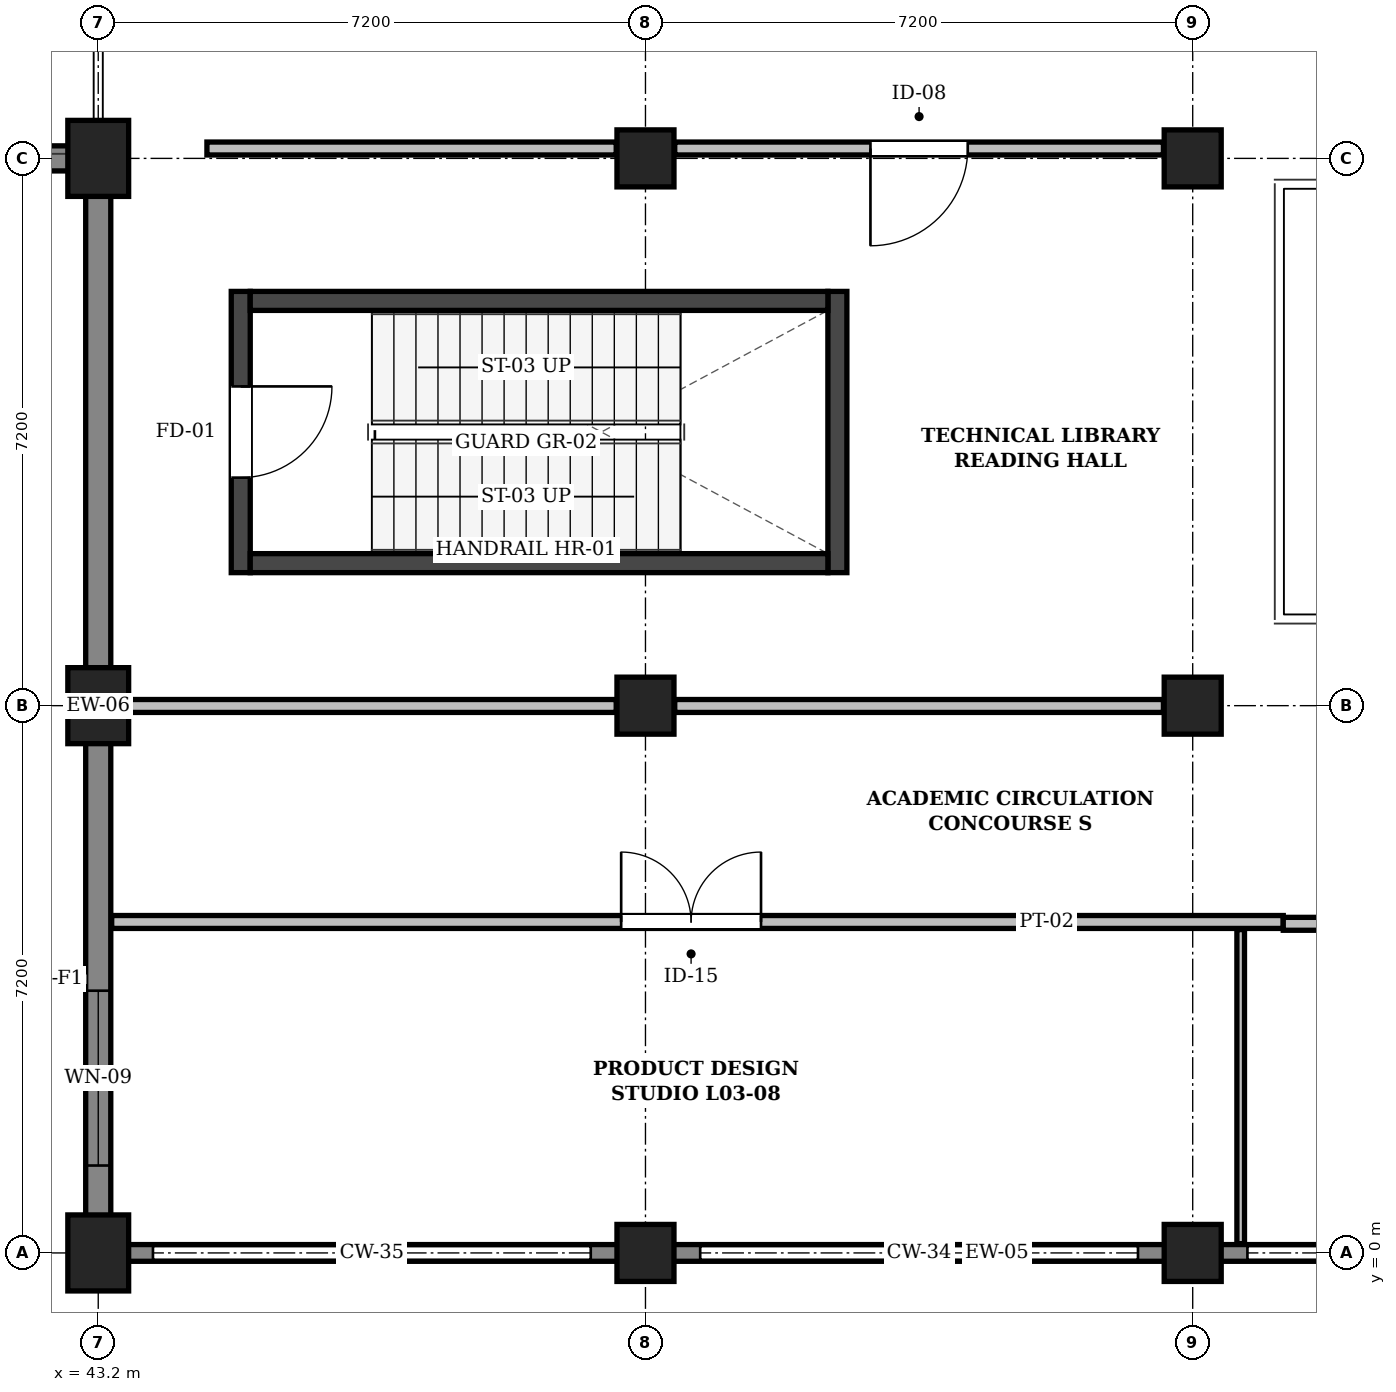
"""IFC4 building model, lengths in metres.
Left out: names, types, materials, properties, quantities, classifications, styles, units other than length and angle.
Written with IfcOpenShell. Run it as: python <this file> out.ifc"""

import sys

from ifc_helpers import new_model, si_unit, direction, frame, frame_2d, origin, origin_2d, place, context, subcontext, project, spatial, rectangle, extrude, element, fill, save


model = new_model("IFC4")
c1 = context("Model", 3, precision=1e-05, world=origin(), true_north=direction((0.0, 1.0)))
c2 = subcontext(c1, "Body", "Model", "MODEL_VIEW")
j1 = project(units=[si_unit("LENGTHUNIT", "METRE"), si_unit("PLANEANGLEUNIT", "RADIAN")], contexts=[c1])
p1 = place(None, origin())
s1 = spatial("IfcSite", under=j1, at=p1, CompositionType="ELEMENT")
p2 = place(p1, origin())
s2 = spatial("IfcBuilding", under=s1, at=p2, CompositionType="ELEMENT")
p3 = place(p2, frame((0.0, 0.0, 14.4)))
s3 = spatial("IfcBuildingStorey", under=s2, at=p3, CompositionType="ELEMENT", Elevation=14.4)
for number, where, z_axis, x_axis in (
    (1, (43.2, 0.0, 0.0), (0.0, 0.0, 1.0), (1.0, 0.0, 0.0)),
    (2, (43.2, 7.2, 0.0), (0.0, 0.0, 1.0), (1.0, 0.0, 0.0)),
    (3, (43.2, 14.4, 0.0), (0.0, 0.0, 1.0), (1.0, 0.0, 0.0)),
):
    element("IfcColumn", number, at=place(p3, frame(where, z_axis=z_axis, x_axis=x_axis)), inside=s3, PredefinedType="COLUMN", context=c2, shape_type="SweptSolid", body=[
        extrude(rectangle(XDim=0.8, YDim=1.0, at=origin_2d()), origin(), (0.0, 0.0, 1.0), 4.5),
    ])
for number, where, z_axis, x_axis in (
    (4, (50.4, 0.0, 0.0), (0.0, 0.0, 1.0), (1.0, 0.0, 0.0)),
    (5, (50.4, 7.2, 0.0), (0.0, 0.0, 1.0), (1.0, 0.0, 0.0)),
    (6, (50.4, 14.4, 0.0), (0.0, 0.0, 1.0), (1.0, 0.0, 0.0)),
    (7, (57.6, 0.0, 0.0), (0.0, 0.0, 1.0), (1.0, 0.0, 0.0)),
    (8, (57.6, 7.2, 0.0), (0.0, 0.0, 1.0), (1.0, 0.0, 0.0)),
    (9, (57.6, 14.4, 0.0), (0.0, 0.0, 1.0), (1.0, 0.0, 0.0)),
):
    element("IfcColumn", number, at=place(p3, frame(where, z_axis=z_axis, x_axis=x_axis)), inside=s3, PredefinedType="COLUMN", context=c2, shape_type="SweptSolid", body=[
        extrude(rectangle(XDim=0.75, YDim=0.75, at=origin_2d()), origin(), (0.0, 0.0, 1.0), 4.5),
    ])
p4 = place(p3, frame((64.8, 0.0, 0.0), z_axis=(0.0, 0.0, 1.0), x_axis=(-1.0, 0.0, 0.0)))
e10 = element("IfcWall", 10, at=p4, inside=s3, PredefinedType="SOLIDWALL", context=c2, shape_type="SweptSolid", body=[
    extrude(rectangle(XDim=7.2, YDim=0.22, at=frame_2d((3.6, 0.0))), origin(), (0.0, 0.0, 1.0), 1.24),
])
p5 = place(p3, frame((57.6, 0.0, 0.0), z_axis=(0.0, 0.0, 1.0), x_axis=(-1.0, 0.0, 0.0)))
e11 = element("IfcWall", 11, at=p5, inside=s3, PredefinedType="SOLIDWALL", context=c2, shape_type="SweptSolid", body=[
    extrude(rectangle(XDim=7.2, YDim=0.22, at=frame_2d((3.6, 0.0))), origin(), (0.0, 0.0, 1.0), 1.24),
])
p6 = place(p3, frame((50.4, 0.0, 0.0), z_axis=(0.0, 0.0, 1.0), x_axis=(-1.0, 0.0, 0.0)))
e12 = element("IfcWall", 12, at=p6, inside=s3, PredefinedType="SOLIDWALL", context=c2, shape_type="SweptSolid", body=[
    extrude(rectangle(XDim=7.35, YDim=0.22, at=frame_2d((3.675, 0.0))), origin(), (0.0, 0.0, 1.0), 1.24),
])
p7 = place(p3, frame((43.2, 0.166, 0.0), z_axis=(0.0, 0.0, 1.0), x_axis=(0.0, 1.0, 0.0)))
e13 = element("IfcWall", 13, at=p7, inside=s3, PredefinedType="SOLIDWALL", context=c2, shape_type="SweptSolid", body=[
    extrude(rectangle(XDim=7.034, YDim=0.33, at=frame_2d((3.517, 0.0))), origin(), (0.0, 0.0, 1.0), 4.22),
])
p8 = place(p7, frame((0.984, 0.0, 0.95)))
e14 = element("IfcOpeningElement", 14, at=p8, cuts=e13, PredefinedType="OPENING", context=c2, shape_type="SweptSolid", body=[
    extrude(rectangle(XDim=2.3, YDim=1.3, at=frame_2d((1.15, 0.65))), frame((0.0, 0.177, 0.0), z_axis=(0.0, -1.0, 0.0), x_axis=(1.0, 0.0, 0.0)), (0.0, 0.0, 1.0), 0.354),
])
p9 = place(p3, frame((43.2, 7.2, 0.0), z_axis=(0.0, 0.0, 1.0), x_axis=(0.0, 1.0, 0.0)))
e15 = element("IfcWall", 15, at=p9, inside=s3, PredefinedType="SOLIDWALL", context=c2, shape_type="SweptSolid", body=[
    extrude(rectangle(XDim=7.034, YDim=0.33, at=frame_2d((3.517, 0.0))), origin(), (0.0, 0.0, 1.0), 4.22),
])
p10 = place(p3, frame((43.35, 14.4, 0.0), z_axis=(0.0, 0.0, 1.0), x_axis=(-1.0, 0.0, 0.0)))
e16 = element("IfcWall", 16, at=p10, inside=s3, PredefinedType="SOLIDWALL", context=c2, shape_type="SweptSolid", body=[
    extrude(rectangle(XDim=7.35, YDim=0.33, at=frame_2d((3.675, 0.0))), origin(), (0.0, 0.0, 1.0), 4.22),
])
p11 = place(p10, frame((2.425, 0.0, 0.95)))
e17 = element("IfcOpeningElement", 17, at=p11, cuts=e16, PredefinedType="OPENING", context=c2, shape_type="SweptSolid", body=[
    extrude(rectangle(XDim=2.5, YDim=1.3, at=frame_2d((1.25, 0.65))), frame((0.0, 0.177, 0.0), z_axis=(0.0, -1.0, 0.0), x_axis=(1.0, 0.0, 0.0)), (0.0, 0.0, 1.0), 0.354),
])
p12 = place(p3, frame((45.075, 8.95, 0.0), z_axis=(0.0, 0.0, 1.0), x_axis=(0.0, 1.0, 0.0)))
e18 = element("IfcWall", 18, at=p12, inside=s3, PredefinedType="SHEAR", context=c2, shape_type="SweptSolid", body=[
    extrude(rectangle(XDim=3.7, YDim=0.25, at=frame_2d((1.85, 0.0))), origin(), (0.0, 0.0, 1.0), 4.25),
])
p13 = place(p12, frame((1.25, 0.0, 0.0)))
e19 = element("IfcOpeningElement", 19, at=p13, cuts=e18, PredefinedType="OPENING", context=c2, shape_type="SweptSolid", body=[
    extrude(rectangle(XDim=1.2, YDim=2.15, at=frame_2d((0.6, 1.075))), frame((0.0, 0.137, 0.0), z_axis=(0.0, -1.0, 0.0), x_axis=(1.0, 0.0, 0.0)), (0.0, 0.0, 1.0), 0.274),
])
p14 = place(p3, frame((52.925, 8.95, 0.0), z_axis=(0.0, 0.0, 1.0), x_axis=(0.0, 1.0, 0.0)))
e20 = element("IfcWall", 20, at=p14, inside=s3, PredefinedType="SHEAR", context=c2, shape_type="SweptSolid", body=[
    extrude(rectangle(XDim=3.7, YDim=0.25, at=frame_2d((1.85, 0.0))), origin(), (0.0, 0.0, 1.0), 4.25),
])
for number, where, z_axis, x_axis in (
    (21, (45.2, 9.075, 0.0), (0.0, 0.0, 1.0), (1.0, 0.0, 0.0)),
    (22, (45.2, 12.525, 0.0), (0.0, 0.0, 1.0), (1.0, 0.0, 0.0)),
):
    element("IfcWall", number, at=place(p3, frame(where, z_axis=z_axis, x_axis=x_axis)), inside=s3, PredefinedType="SHEAR", context=c2, shape_type="SweptSolid", body=[
        extrude(rectangle(XDim=7.6, YDim=0.25, at=frame_2d((3.8, 0.0))), origin(), (0.0, 0.0, 1.0), 4.25),
    ])
p15 = place(p3, frame((50.785, 14.53, 0.0), z_axis=(0.0, 0.0, 1.0), x_axis=(1.0, 0.0, 0.0)))
e23 = element("IfcWall", 23, at=p15, inside=s3, PredefinedType="PARTITIONING", context=c2, shape_type="SweptSolid", body=[
    extrude(rectangle(XDim=6.43, YDim=0.17, at=frame_2d((3.215, 0.0))), origin(), (0.0, 0.0, 1.0), 3.7),
])
p16 = place(p15, frame((2.575, 0.0, 0.0)))
e24 = element("IfcOpeningElement", 24, at=p16, cuts=e23, PredefinedType="OPENING", context=c2, shape_type="SweptSolid", body=[
    extrude(rectangle(XDim=1.28, YDim=2.22, at=frame_2d((0.64, 1.11))), frame((0.0, 0.097, 0.0), z_axis=(0.0, -1.0, 0.0), x_axis=(1.0, 0.0, 0.0)), (0.0, 0.0, 1.0), 0.194),
])
p17 = place(p3, frame((44.63, 14.53, 0.0), z_axis=(0.0, 0.0, 1.0), x_axis=(1.0, 0.0, 0.0)))
e25 = element("IfcWall", 25, at=p17, inside=s3, PredefinedType="PARTITIONING", context=c2, shape_type="SweptSolid", body=[
    extrude(rectangle(XDim=5.385, YDim=0.17, at=frame_2d((2.692, 0.0))), origin(), (0.0, 0.0, 1.0), 3.7),
])
p18 = place(p3, frame((43.377, 4.354, 0.0), z_axis=(0.0, 0.0, 1.0), x_axis=(1.0, 0.0, 0.0)))
e26 = element("IfcWall", 26, at=p18, inside=s3, PredefinedType="PARTITIONING", context=c2, shape_type="SweptSolid", body=[
    extrude(rectangle(XDim=15.415, YDim=0.17, at=frame_2d((7.707, 0.0))), origin(), (0.0, 0.0, 1.0), 4.16),
])
p19 = place(p18, frame((6.703, 0.0, 0.0)))
e27 = element("IfcOpeningElement", 27, at=p19, cuts=e26, PredefinedType="OPENING", context=c2, shape_type="SweptSolid", body=[
    extrude(rectangle(XDim=1.84, YDim=2.3, at=frame_2d((0.92, 1.15))), frame((0.0, 0.097, 0.0), z_axis=(0.0, -1.0, 0.0), x_axis=(1.0, 0.0, 0.0)), (0.0, 0.0, 1.0), 0.194),
])
p20 = place(p3, frame((50.785, 7.196, 0.0), z_axis=(0.0, 0.0, 1.0), x_axis=(1.0, 0.0, 0.0)))
e28 = element("IfcWall", 28, at=p20, inside=s3, PredefinedType="PARTITIONING", context=c2, shape_type="SweptSolid", body=[
    extrude(rectangle(XDim=6.43, YDim=0.17, at=frame_2d((3.215, 0.0))), origin(), (0.0, 0.0, 1.0), 3.7),
])
p21 = place(p3, frame((43.377, 7.196, 0.0), z_axis=(0.0, 0.0, 1.0), x_axis=(1.0, 0.0, 0.0)))
e29 = element("IfcWall", 29, at=p21, inside=s3, PredefinedType="PARTITIONING", context=c2, shape_type="SweptSolid", body=[
    extrude(rectangle(XDim=6.638, YDim=0.17, at=frame_2d((3.319, 0.0))), origin(), (0.0, 0.0, 1.0), 3.7),
])
p22 = place(p3, frame((58.792, 4.33, 0.0), z_axis=(0.0, 0.0, 1.0), x_axis=(1.0, 0.0, 0.0)))
e30 = element("IfcWall", 30, at=p22, inside=s3, PredefinedType="PARTITIONING", context=c2, shape_type="SweptSolid", body=[
    extrude(rectangle(XDim=14.337, YDim=0.17, at=frame_2d((7.168, 0.0))), origin(), (0.0, 0.0, 1.0), 4.16),
])
p23 = place(p22, frame((6.149, 0.0, 0.0)))
e31 = element("IfcOpeningElement", 31, at=p23, cuts=e30, PredefinedType="OPENING", context=c2, shape_type="SweptSolid", body=[
    extrude(rectangle(XDim=2.04, YDim=2.34, at=frame_2d((1.02, 1.17))), frame((0.0, 0.097, 0.0), z_axis=(0.0, -1.0, 0.0), x_axis=(1.0, 0.0, 0.0)), (0.0, 0.0, 1.0), 0.194),
])
p24 = place(p3, frame((58.231, 0.122, 0.0), z_axis=(0.0, 0.0, 1.0), x_axis=(0.0, 1.0, 0.0)))
e32 = element("IfcWall", 32, at=p24, inside=s3, PredefinedType="PARTITIONING", context=c2, shape_type="SweptSolid", body=[
    extrude(rectangle(XDim=4.132, YDim=0.1, at=frame_2d((2.066, 0.0))), origin(), (0.0, 0.0, 1.0), 4.16),
])
p25 = place(p8, origin())
e33 = element("IfcWindow", 33, at=p25, inside=s3, PartitioningType="SINGLE_PANEL", PredefinedType="WINDOW", context=c2, shape_type="SweptSolid", body=[
    extrude(rectangle(XDim=2.3, YDim=1.3, at=frame_2d((1.15, 0.65))), frame((0.0, 0.03, 0.0), z_axis=(0.0, -1.0, 0.0), x_axis=(1.0, 0.0, 0.0)), (0.0, 0.0, 1.0), 0.06),
])
fill(e14, e33)
p26 = place(p13, frame((1.2, 0.0, 0.0), z_axis=(0.0, 0.0, 1.0), x_axis=(-1.0, 0.0, 0.0)))
e34 = element("IfcDoor", 34, at=p26, inside=s3, OperationType="SINGLE_SWING_LEFT", PredefinedType="DOOR", context=c2, shape_type="SweptSolid", body=[
    extrude(rectangle(XDim=1.2, YDim=2.15, at=frame_2d((0.6, 1.075))), frame((0.0, 0.025, 0.0), z_axis=(0.0, -1.0, 0.0), x_axis=(1.0, 0.0, 0.0)), (0.0, 0.0, 1.0), 0.05),
])
fill(e19, e34)
p27 = place(p19, origin())
e35 = element("IfcDoor", 35, at=p27, inside=s3, OperationType="DOUBLE_DOOR_SINGLE_SWING", PredefinedType="DOOR", context=c2, shape_type="SweptSolid", body=[
    extrude(rectangle(XDim=1.84, YDim=2.3, at=frame_2d((0.92, 1.15))), frame((0.0, 0.025, 0.0), z_axis=(0.0, -1.0, 0.0), x_axis=(1.0, 0.0, 0.0)), (0.0, 0.0, 1.0), 0.05),
])
fill(e27, e35)
p28 = place(p16, frame((1.28, 0.0, 0.0), z_axis=(0.0, 0.0, 1.0), x_axis=(-1.0, 0.0, 0.0)))
e36 = element("IfcDoor", 36, at=p28, inside=s3, OperationType="SINGLE_SWING_RIGHT", PredefinedType="DOOR", context=c2, shape_type="SweptSolid", body=[
    extrude(rectangle(XDim=1.28, YDim=2.22, at=frame_2d((0.64, 1.11))), frame((0.0, 0.025, 0.0), z_axis=(0.0, -1.0, 0.0), x_axis=(1.0, 0.0, 0.0)), (0.0, 0.0, 1.0), 0.05),
])
fill(e24, e36)
save(model, sys.argv[1])
